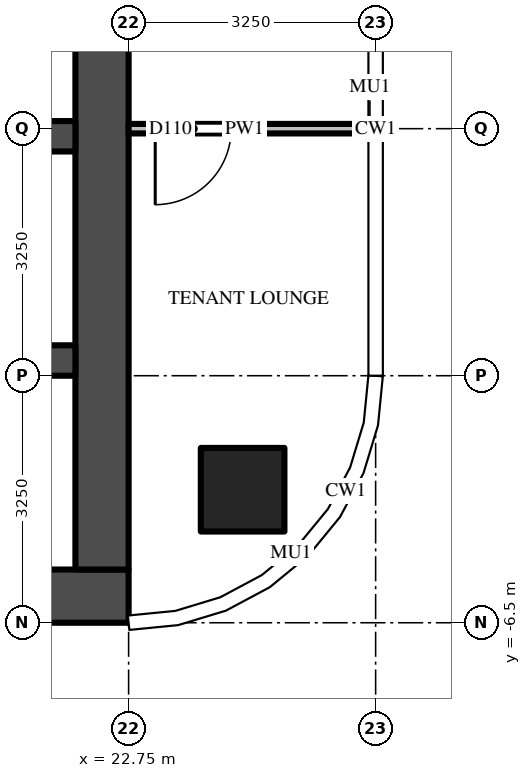
"""IFC4 building model, lengths in metres.
Left out: names, types, materials, properties, quantities, classifications, styles, units other than length and angle.
Written with IfcOpenShell. Run it as: python <this file> out.ifc"""

import sys

from ifc_helpers import new_model, si_unit, direction, frame, frame_2d, origin, origin_2d, place, context, subcontext, project, spatial, rectangle, extrude, source, transform, mapped, element, fill, save


model = new_model("IFC4")
c1 = context("Model", 3, precision=1e-05, world=origin(), true_north=direction((0.0, 1.0)))
c2 = subcontext(c1, "Body", "Model", "MODEL_VIEW")
j1 = project(units=[si_unit("LENGTHUNIT", "METRE"), si_unit("PLANEANGLEUNIT", "RADIAN")], contexts=[c1])
p1 = place(None, origin())
s1 = spatial("IfcSite", under=j1, at=p1, CompositionType="ELEMENT")
p2 = place(p1, origin())
s2 = spatial("IfcBuilding", under=s1, at=p2, CompositionType="ELEMENT")
p3 = place(p2, frame((0.0, 0.0, 267.5)))
s3 = spatial("IfcBuildingStorey", under=s2, at=p3, CompositionType="ELEMENT", Elevation=267.5)
m1 = source(origin(), c2, "Body", "SweptSolid", [
    extrude(rectangle(XDim=1.1, YDim=1.1, at=origin_2d()), origin(), (0.0, 0.0, 1.0), 3.9),
])
p4 = place(p3, frame((24.25, -4.75, 0.0), z_axis=(0.0, 0.0, 1.0), x_axis=(1.0, 0.0, 0.0)))
e1 = element("IfcColumn", 1, at=p4, inside=s3, PredefinedType="COLUMN", context=c2, shape_type="MappedRepresentation", body=[
    mapped(m1, transform((0.0, 0.0, 0.0))),
])
m2 = source(origin(), c2, "Body", "SweptSolid", [
    extrude(rectangle(XDim=16.6, YDim=0.7, at=frame_2d((8.3, 0.0))), origin(), (0.0, 0.0, 1.0), 3.45),
])
p5 = place(p3, frame((6.15, -6.15, 0.0), z_axis=(0.0, 0.0, 1.0), x_axis=(1.0, 0.0, 0.0)))
e2 = element("IfcWall", 2, at=p5, inside=s3, PredefinedType="SHEAR", context=c2, shape_type="MappedRepresentation", body=[
    mapped(m2, transform((0.0, 0.0, 0.0))),
])
m3 = source(origin(), c2, "Body", "SweptSolid", [
    extrude(rectangle(XDim=9.05, YDim=0.7, at=frame_2d((4.525, 0.0))), origin(), (0.0, 0.0, 1.0), 3.45),
])
p6 = place(p3, frame((22.4, -5.8, 0.0), z_axis=(0.0, 0.0, 1.0), x_axis=(0.0, 1.0, 0.0)))
e3 = element("IfcWall", 3, at=p6, inside=s3, PredefinedType="SHEAR", context=c2, shape_type="MappedRepresentation", body=[
    mapped(m3, transform((0.0, 0.0, 0.0))),
])
m4 = source(origin(), c2, "Body", "SweptSolid", [
    extrude(rectangle(XDim=14.85, YDim=0.4, at=frame_2d((7.425, 0.0))), origin(), (0.0, 0.0, 1.0), 3.45),
])
p7 = place(p3, frame((7.2, -0.1, 0.0), z_axis=(0.0, 0.0, 1.0), x_axis=(1.0, 0.0, 0.0)))
e4 = element("IfcWall", 4, at=p7, inside=s3, PredefinedType="SHEAR", context=c2, shape_type="MappedRepresentation", body=[
    mapped(m4, transform((0.0, 0.0, 0.0))),
])
m5 = source(origin(), c2, "Body", "SweptSolid", [
    extrude(rectangle(XDim=1.0, YDim=2.1, at=frame_2d((0.5, 1.05))), frame((0.0, 0.21, 0.0), z_axis=(0.0, -1.0, 0.0), x_axis=(1.0, 0.0, 0.0)), (0.0, 0.0, 1.0), 0.42),
])
p8 = place(p7, frame((7.9, 0.0, 0.0)))
e5 = element("IfcOpeningElement", 5, at=p8, cuts=e4, PredefinedType="OPENING", context=c2, shape_type="MappedRepresentation", body=[
    mapped(m5, transform((0.0, 0.0, 0.0))),
])
m6 = source(origin(), c2, "Body", "SweptSolid", [
    extrude(rectangle(XDim=5.7, YDim=0.4, at=frame_2d((2.85, 0.0))), origin(), (0.0, 0.0, 1.0), 3.45),
])
p9 = place(p3, frame((16.35, -3.05, 0.0), z_axis=(0.0, 0.0, 1.0), x_axis=(1.0, 0.0, 0.0)))
e6 = element("IfcWall", 6, at=p9, inside=s3, PredefinedType="SHEAR", context=c2, shape_type="MappedRepresentation", body=[
    mapped(m6, transform((0.0, 0.0, 0.0))),
])
p10 = place(p3, frame((25.8, 0.0, 0.0), z_axis=(0.0, 0.0, 1.0), x_axis=(-1.0, 0.0, 0.0)))
e7 = element("IfcWall", 7, at=p10, inside=s3, PredefinedType="PARTITIONING", context=c2, shape_type="SweptSolid", body=[
    extrude(rectangle(XDim=3.05, YDim=0.125, at=frame_2d((1.525, 0.0))), origin(), (0.0, 0.0, 1.0), 2.53),
])
m7 = source(origin(), c2, "Body", "SweptSolid", [
    extrude(rectangle(XDim=1.0, YDim=2.1, at=frame_2d((0.5, 1.05))), frame((0.0, 0.073, 0.0), z_axis=(0.0, -1.0, 0.0), x_axis=(1.0, 0.0, 0.0)), (0.0, 0.0, 1.0), 0.145),
])
p11 = place(p10, frame((1.7, 0.0, 0.0)))
e8 = element("IfcOpeningElement", 8, at=p11, cuts=e7, PredefinedType="OPENING", context=c2, shape_type="MappedRepresentation", body=[
    mapped(m7, transform((0.0, 0.0, 0.0))),
])
m8 = source(origin(), c2, "Body", "SweptSolid", [
    extrude(rectangle(XDim=1.0, YDim=2.1, at=frame_2d((0.5, 1.05))), frame((0.0, 0.025, 0.0), z_axis=(0.0, -1.0, 0.0), x_axis=(1.0, 0.0, 0.0)), (0.0, 0.0, 1.0), 0.05),
])
p12 = place(p11, origin())
e9 = element("IfcDoor", 9, at=p12, inside=s3, OperationType="SINGLE_SWING_RIGHT", PredefinedType="DOOR", context=c2, shape_type="MappedRepresentation", body=[
    mapped(m8, transform((0.0, 0.0, 0.0))),
])
fill(e8, e9)
save(model, sys.argv[1])
